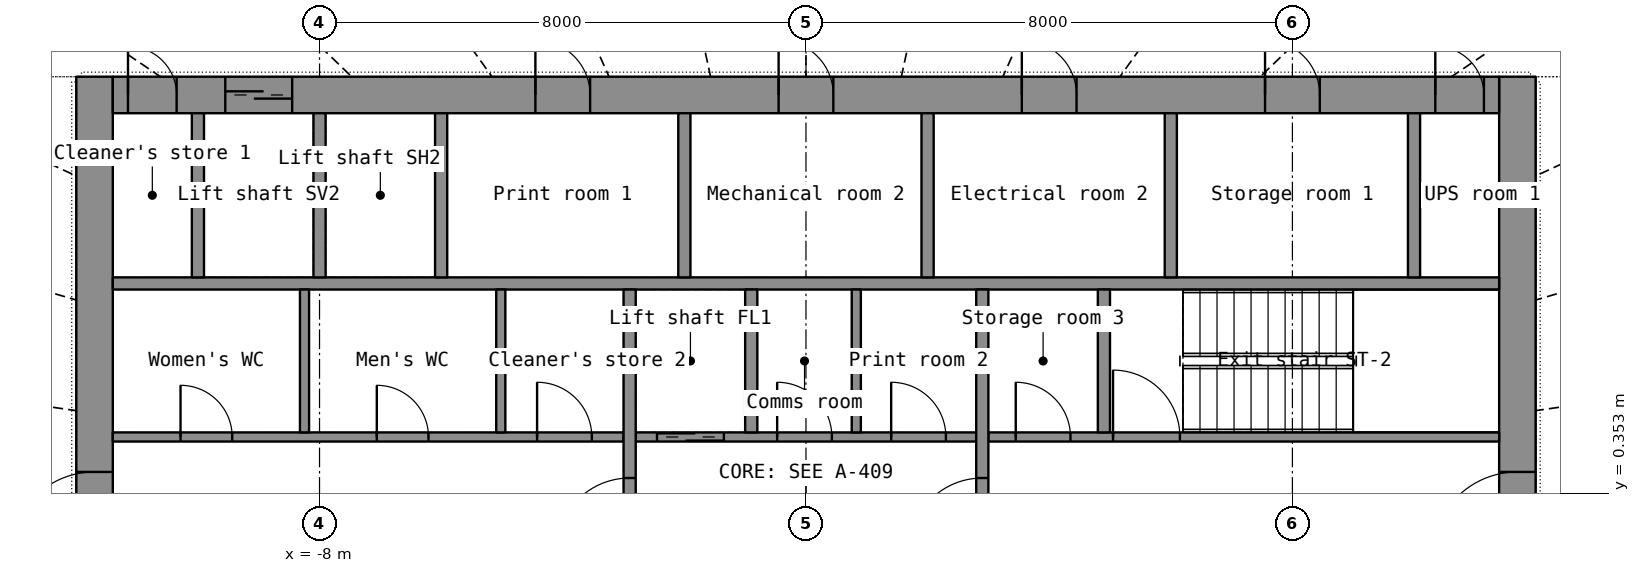
"""IFC4 building model, lengths in metres.
Left out: names, types, materials, properties, quantities, classifications, styles, units other than length and angle.
Written with IfcOpenShell. Run it as: python <this file> out.ifc"""

import sys

from ifc_helpers import new_model, si_unit, direction, frame, frame_2d, origin, place, context, subcontext, project, spatial, rectangle, extrude, element, fill, save


model = new_model("IFC4")
c1 = context("Model", 3, precision=1e-05, world=origin(), true_north=direction((0.0, 1.0)))
c2 = subcontext(c1, "Body", "Model", "MODEL_VIEW")
j1 = project(units=[si_unit("LENGTHUNIT", "METRE"), si_unit("PLANEANGLEUNIT", "RADIAN")], contexts=[c1])
p1 = place(None, origin())
s1 = spatial("IfcSite", under=j1, at=p1, CompositionType="ELEMENT")
p2 = place(p1, origin())
s2 = spatial("IfcBuilding", under=s1, at=p2, CompositionType="ELEMENT")
p3 = place(p2, frame((0.0, 0.0, 48.2)))
s3 = spatial("IfcBuildingStorey", under=s2, at=p3, CompositionType="ELEMENT", Elevation=48.2)
p4 = place(p3, frame((-11.7, -7.2, 0.0), z_axis=(0.0, 0.0, 1.0), x_axis=(0.0, 1.0, 0.0)))
e1 = element("IfcWall", 1, at=p4, inside=s3, PredefinedType="SHEAR", context=c2, shape_type="SweptSolid", body=[
    extrude(rectangle(XDim=14.4, YDim=0.6, at=frame_2d((7.2, 0.0))), origin(), (0.0, 0.0, 1.0), 3.3),
])
p5 = place(p4, frame((6.5, 0.0, 0.0)))
e2 = element("IfcOpeningElement", 2, at=p5, cuts=e1, PredefinedType="OPENING", context=c2, shape_type="SweptSolid", body=[
    extrude(rectangle(XDim=1.4, YDim=2.2, at=frame_2d((0.7, 1.1))), frame((0.0, 0.31, 0.0), z_axis=(0.0, -1.0, 0.0), x_axis=(1.0, 0.0, 0.0)), (0.0, 0.0, 1.0), 0.62),
])
p6 = place(p3, frame((11.7, -7.2, 0.0), z_axis=(0.0, 0.0, 1.0), x_axis=(0.0, 1.0, 0.0)))
e3 = element("IfcWall", 3, at=p6, inside=s3, PredefinedType="SHEAR", context=c2, shape_type="SweptSolid", body=[
    extrude(rectangle(XDim=14.4, YDim=0.6, at=frame_2d((7.2, 0.0))), origin(), (0.0, 0.0, 1.0), 3.3),
])
p7 = place(p6, frame((6.5, 0.0, 0.0)))
e4 = element("IfcOpeningElement", 4, at=p7, cuts=e3, PredefinedType="OPENING", context=c2, shape_type="SweptSolid", body=[
    extrude(rectangle(XDim=1.4, YDim=2.2, at=frame_2d((0.7, 1.1))), frame((0.0, 0.31, 0.0), z_axis=(0.0, -1.0, 0.0), x_axis=(1.0, 0.0, 0.0)), (0.0, 0.0, 1.0), 0.62),
])
p8 = place(p3, frame((-11.4, 6.9, 0.0), z_axis=(0.0, 0.0, 1.0), x_axis=(1.0, 0.0, 0.0)))
e5 = element("IfcWall", 5, at=p8, inside=s3, PredefinedType="SHEAR", context=c2, shape_type="SweptSolid", body=[
    extrude(rectangle(XDim=22.8, YDim=0.6, at=frame_2d((11.4, 0.0))), origin(), (0.0, 0.0, 1.0), 3.3),
])
p9 = place(p8, frame((1.85, 0.0, 0.0)))
e6 = element("IfcOpeningElement", 6, at=p9, cuts=e5, PredefinedType="OPENING", context=c2, shape_type="SweptSolid", body=[
    extrude(rectangle(XDim=1.1, YDim=2.2, at=frame_2d((0.55, 1.1))), frame((0.0, 0.31, 0.0), z_axis=(0.0, -1.0, 0.0), x_axis=(1.0, 0.0, 0.0)), (0.0, 0.0, 1.0), 0.62),
])
p10 = place(p8, frame((6.95, 0.0, 0.0)))
e7 = element("IfcOpeningElement", 7, at=p10, cuts=e5, PredefinedType="OPENING", context=c2, shape_type="SweptSolid", body=[
    extrude(rectangle(XDim=0.9, YDim=2.1, at=frame_2d((0.45, 1.05))), frame((0.0, 0.31, 0.0), z_axis=(0.0, -1.0, 0.0), x_axis=(1.0, 0.0, 0.0)), (0.0, 0.0, 1.0), 0.62),
])
p11 = place(p8, frame((10.95, 0.0, 0.0)))
e8 = element("IfcOpeningElement", 8, at=p11, cuts=e5, PredefinedType="OPENING", context=c2, shape_type="SweptSolid", body=[
    extrude(rectangle(XDim=0.9, YDim=2.1, at=frame_2d((0.45, 1.05))), frame((0.0, 0.31, 0.0), z_axis=(0.0, -1.0, 0.0), x_axis=(1.0, 0.0, 0.0)), (0.0, 0.0, 1.0), 0.62),
])
p12 = place(p8, frame((14.95, 0.0, 0.0)))
e9 = element("IfcOpeningElement", 9, at=p12, cuts=e5, PredefinedType="OPENING", context=c2, shape_type="SweptSolid", body=[
    extrude(rectangle(XDim=0.9, YDim=2.1, at=frame_2d((0.45, 1.05))), frame((0.0, 0.31, 0.0), z_axis=(0.0, -1.0, 0.0), x_axis=(1.0, 0.0, 0.0)), (0.0, 0.0, 1.0), 0.62),
])
p13 = place(p8, frame((18.95, 0.0, 0.0)))
e10 = element("IfcOpeningElement", 10, at=p13, cuts=e5, PredefinedType="OPENING", context=c2, shape_type="SweptSolid", body=[
    extrude(rectangle(XDim=0.9, YDim=2.1, at=frame_2d((0.45, 1.05))), frame((0.0, 0.31, 0.0), z_axis=(0.0, -1.0, 0.0), x_axis=(1.0, 0.0, 0.0)), (0.0, 0.0, 1.0), 0.62),
])
p14 = place(p8, frame((0.25, 0.0, 0.0)))
e11 = element("IfcOpeningElement", 11, at=p14, cuts=e5, PredefinedType="OPENING", context=c2, shape_type="SweptSolid", body=[
    extrude(rectangle(XDim=0.8, YDim=2.05, at=frame_2d((0.4, 1.025))), frame((0.0, 0.31, 0.0), z_axis=(0.0, -1.0, 0.0), x_axis=(1.0, 0.0, 0.0)), (0.0, 0.0, 1.0), 0.62),
])
p15 = place(p8, frame((21.75, 0.0, 0.0)))
e12 = element("IfcOpeningElement", 12, at=p15, cuts=e5, PredefinedType="OPENING", context=c2, shape_type="SweptSolid", body=[
    extrude(rectangle(XDim=0.8, YDim=2.05, at=frame_2d((0.4, 1.025))), frame((0.0, 0.31, 0.0), z_axis=(0.0, -1.0, 0.0), x_axis=(1.0, 0.0, 0.0)), (0.0, 0.0, 1.0), 0.62),
])
p16 = place(p3, frame((-11.4, 3.8, 0.0), z_axis=(0.0, 0.0, 1.0), x_axis=(1.0, 0.0, 0.0)))
e13 = element("IfcWall", 13, at=p16, inside=s3, PredefinedType="SHEAR", context=c2, shape_type="SweptSolid", body=[
    extrude(rectangle(XDim=22.8, YDim=0.2, at=frame_2d((11.4, 0.0))), origin(), (0.0, 0.0, 1.0), 3.3),
])
for number, where, z_axis, x_axis in (
    (14, (-10.0, 3.9, 0.0), (0.0, 0.0, 1.0), (0.0, 1.0, 0.0)),
    (15, (-8.0, 3.9, 0.0), (0.0, 0.0, 1.0), (0.0, 1.0, 0.0)),
    (16, (-6.0, 3.9, 0.0), (0.0, 0.0, 1.0), (0.0, 1.0, 0.0)),
    (17, (10.0, 3.9, 0.0), (0.0, 0.0, 1.0), (0.0, 1.0, 0.0)),
):
    element("IfcWall", number, at=place(p3, frame(where, z_axis=z_axis, x_axis=x_axis)), inside=s3, PredefinedType="SHEAR", context=c2, shape_type="SweptSolid", body=[
        extrude(rectangle(XDim=2.7, YDim=0.2, at=frame_2d((1.35, 0.0))), origin(), (0.0, 0.0, 1.0), 3.3),
    ])
for number, where, z_axis, x_axis in (
    (18, (-2.0, 3.9, 0.0), (0.0, 0.0, 1.0), (0.0, 1.0, 0.0)),
    (19, (2.0, 3.9, 0.0), (0.0, 0.0, 1.0), (0.0, 1.0, 0.0)),
    (20, (6.0, 3.9, 0.0), (0.0, 0.0, 1.0), (0.0, 1.0, 0.0)),
):
    element("IfcWall", number, at=place(p3, frame(where, z_axis=z_axis, x_axis=x_axis)), inside=s3, PredefinedType="PARTITIONING", context=c2, shape_type="SweptSolid", body=[
        extrude(rectangle(XDim=2.7, YDim=0.2, at=frame_2d((1.35, 0.0))), origin(), (0.0, 0.0, 1.0), 3.3),
    ])
p17 = place(p3, frame((-11.4, 1.275, 0.0), z_axis=(0.0, 0.0, 1.0), x_axis=(1.0, 0.0, 0.0)))
e21 = element("IfcWall", 21, at=p17, inside=s3, PredefinedType="PARTITIONING", context=c2, shape_type="SweptSolid", body=[
    extrude(rectangle(XDim=8.4, YDim=0.15, at=frame_2d((4.2, 0.0))), origin(), (0.0, 0.0, 1.0), 3.3),
])
p18 = place(p17, frame((1.114, 0.0, 0.0)))
e22 = element("IfcOpeningElement", 22, at=p18, cuts=e21, PredefinedType="OPENING", context=c2, shape_type="SweptSolid", body=[
    extrude(rectangle(XDim=0.85, YDim=2.1, at=frame_2d((0.425, 1.05))), frame((0.0, 0.085, 0.0), z_axis=(0.0, -1.0, 0.0), x_axis=(1.0, 0.0, 0.0)), (0.0, 0.0, 1.0), 0.17),
])
p19 = place(p17, frame((4.342, 0.0, 0.0)))
e23 = element("IfcOpeningElement", 23, at=p19, cuts=e21, PredefinedType="OPENING", context=c2, shape_type="SweptSolid", body=[
    extrude(rectangle(XDim=0.85, YDim=2.1, at=frame_2d((0.425, 1.05))), frame((0.0, 0.085, 0.0), z_axis=(0.0, -1.0, 0.0), x_axis=(1.0, 0.0, 0.0)), (0.0, 0.0, 1.0), 0.17),
])
p20 = place(p17, frame((6.978, 0.0, 0.0)))
e24 = element("IfcOpeningElement", 24, at=p20, cuts=e21, PredefinedType="OPENING", context=c2, shape_type="SweptSolid", body=[
    extrude(rectangle(XDim=0.9, YDim=2.1, at=frame_2d((0.45, 1.05))), frame((0.0, 0.085, 0.0), z_axis=(0.0, -1.0, 0.0), x_axis=(1.0, 0.0, 0.0)), (0.0, 0.0, 1.0), 0.17),
])
p21 = place(p3, frame((-2.8, 1.275, 0.0), z_axis=(0.0, 0.0, 1.0), x_axis=(1.0, 0.0, 0.0)))
e25 = element("IfcWall", 25, at=p21, inside=s3, PredefinedType="SHEAR", context=c2, shape_type="SweptSolid", body=[
    extrude(rectangle(XDim=5.6, YDim=0.15, at=frame_2d((2.8, 0.0))), origin(), (0.0, 0.0, 1.0), 3.3),
])
p22 = place(p21, frame((0.35, 0.0, 0.0)))
e26 = element("IfcOpeningElement", 26, at=p22, cuts=e25, PredefinedType="OPENING", context=c2, shape_type="SweptSolid", body=[
    extrude(rectangle(XDim=1.1, YDim=2.2, at=frame_2d((0.55, 1.1))), frame((0.0, 0.085, 0.0), z_axis=(0.0, -1.0, 0.0), x_axis=(1.0, 0.0, 0.0)), (0.0, 0.0, 1.0), 0.17),
])
p23 = place(p21, frame((2.326, 0.0, 0.0)))
e27 = element("IfcOpeningElement", 27, at=p23, cuts=e25, PredefinedType="OPENING", context=c2, shape_type="SweptSolid", body=[
    extrude(rectangle(XDim=0.9, YDim=2.1, at=frame_2d((0.45, 1.05))), frame((0.0, 0.085, 0.0), z_axis=(0.0, -1.0, 0.0), x_axis=(1.0, 0.0, 0.0)), (0.0, 0.0, 1.0), 0.17),
])
p24 = place(p21, frame((4.201, 0.0, 0.0)))
e28 = element("IfcOpeningElement", 28, at=p24, cuts=e25, PredefinedType="OPENING", context=c2, shape_type="SweptSolid", body=[
    extrude(rectangle(XDim=0.9, YDim=2.1, at=frame_2d((0.45, 1.05))), frame((0.0, 0.085, 0.0), z_axis=(0.0, -1.0, 0.0), x_axis=(1.0, 0.0, 0.0)), (0.0, 0.0, 1.0), 0.17),
])
p25 = place(p3, frame((3.0, 1.275, 0.0), z_axis=(0.0, 0.0, 1.0), x_axis=(1.0, 0.0, 0.0)))
e29 = element("IfcWall", 29, at=p25, inside=s3, PredefinedType="SHEAR", context=c2, shape_type="SweptSolid", body=[
    extrude(rectangle(XDim=8.4, YDim=0.15, at=frame_2d((4.2, 0.0))), origin(), (0.0, 0.0, 1.0), 3.3),
])
p26 = place(p25, frame((2.05, 0.0, 0.0)))
e30 = element("IfcOpeningElement", 30, at=p26, cuts=e29, PredefinedType="OPENING", context=c2, shape_type="SweptSolid", body=[
    extrude(rectangle(XDim=1.1, YDim=2.15, at=frame_2d((0.55, 1.075))), frame((0.0, 0.085, 0.0), z_axis=(0.0, -1.0, 0.0), x_axis=(1.0, 0.0, 0.0)), (0.0, 0.0, 1.0), 0.17),
])
p27 = place(p25, frame((0.45, 0.0, 0.0)))
e31 = element("IfcOpeningElement", 31, at=p27, cuts=e29, PredefinedType="OPENING", context=c2, shape_type="SweptSolid", body=[
    extrude(rectangle(XDim=0.9, YDim=2.1, at=frame_2d((0.45, 1.05))), frame((0.0, 0.085, 0.0), z_axis=(0.0, -1.0, 0.0), x_axis=(1.0, 0.0, 0.0)), (0.0, 0.0, 1.0), 0.17),
])
p28 = place(p3, frame((-2.9, -3.7, 0.0), z_axis=(0.0, 0.0, 1.0), x_axis=(0.0, 1.0, 0.0)))
e32 = element("IfcWall", 32, at=p28, inside=s3, PredefinedType="SHEAR", context=c2, shape_type="SweptSolid", body=[
    extrude(rectangle(XDim=7.4, YDim=0.2, at=frame_2d((3.7, 0.0))), origin(), (0.0, 0.0, 1.0), 3.3),
])
p29 = place(p28, frame((3.1, 0.0, 0.0)))
e33 = element("IfcOpeningElement", 33, at=p29, cuts=e32, PredefinedType="OPENING", context=c2, shape_type="SweptSolid", body=[
    extrude(rectangle(XDim=1.2, YDim=2.2, at=frame_2d((0.6, 1.1))), frame((0.0, 0.11, 0.0), z_axis=(0.0, -1.0, 0.0), x_axis=(1.0, 0.0, 0.0)), (0.0, 0.0, 1.0), 0.22),
])
p30 = place(p3, frame((2.9, -3.7, 0.0), z_axis=(0.0, 0.0, 1.0), x_axis=(0.0, 1.0, 0.0)))
e34 = element("IfcWall", 34, at=p30, inside=s3, PredefinedType="SHEAR", context=c2, shape_type="SweptSolid", body=[
    extrude(rectangle(XDim=7.4, YDim=0.2, at=frame_2d((3.7, 0.0))), origin(), (0.0, 0.0, 1.0), 3.3),
])
p31 = place(p30, frame((3.1, 0.0, 0.0)))
e35 = element("IfcOpeningElement", 35, at=p31, cuts=e34, PredefinedType="OPENING", context=c2, shape_type="SweptSolid", body=[
    extrude(rectangle(XDim=1.2, YDim=2.2, at=frame_2d((0.6, 1.1))), frame((0.0, 0.11, 0.0), z_axis=(0.0, -1.0, 0.0), x_axis=(1.0, 0.0, 0.0)), (0.0, 0.0, 1.0), 0.22),
])
for number, where, z_axis, x_axis in (
    (36, (-0.9, 1.35, 0.0), (0.0, 0.0, 1.0), (0.0, 1.0, 0.0)),
    (37, (4.9, 1.35, 0.0), (0.0, 0.0, 1.0), (0.0, 1.0, 0.0)),
):
    element("IfcWall", number, at=place(p3, frame(where, z_axis=z_axis, x_axis=x_axis)), inside=s3, PredefinedType="SHEAR", context=c2, shape_type="SweptSolid", body=[
        extrude(rectangle(XDim=2.35, YDim=0.2, at=frame_2d((1.175, 0.0))), origin(), (0.0, 0.0, 1.0), 3.3),
    ])
for number, where, z_axis, x_axis in (
    (38, (-8.247, 1.35, 0.0), (0.0, 0.0, 1.0), (0.0, 1.0, 0.0)),
    (39, (-5.019, 1.35, 0.0), (0.0, 0.0, 1.0), (0.0, 1.0, 0.0)),
    (40, (0.827, 1.35, 0.0), (0.0, 0.0, 1.0), (0.0, 1.0, 0.0)),
):
    element("IfcWall", number, at=place(p3, frame(where, z_axis=z_axis, x_axis=x_axis)), inside=s3, PredefinedType="PARTITIONING", context=c2, shape_type="SweptSolid", body=[
        extrude(rectangle(XDim=2.35, YDim=0.15, at=frame_2d((1.175, 0.0))), origin(), (0.0, 0.0, 1.0), 3.3),
    ])
p32 = place(p9, origin())
e41 = element("IfcDoor", 41, at=p32, inside=s3, OperationType="DOUBLE_DOOR_SLIDING", PredefinedType="DOOR", context=c2, shape_type="SweptSolid", body=[
    extrude(rectangle(XDim=1.1, YDim=2.2, at=frame_2d((0.55, 1.1))), frame((0.0, 0.025, 0.0), z_axis=(0.0, -1.0, 0.0), x_axis=(1.0, 0.0, 0.0)), (0.0, 0.0, 1.0), 0.05),
])
fill(e6, e41)
p33 = place(p10, origin())
e42 = element("IfcDoor", 42, at=p33, inside=s3, OperationType="SINGLE_SWING_LEFT", PredefinedType="DOOR", context=c2, shape_type="SweptSolid", body=[
    extrude(rectangle(XDim=0.9, YDim=2.1, at=frame_2d((0.45, 1.05))), frame((0.0, 0.025, 0.0), z_axis=(0.0, -1.0, 0.0), x_axis=(1.0, 0.0, 0.0)), (0.0, 0.0, 1.0), 0.05),
])
fill(e7, e42)
p34 = place(p11, origin())
e43 = element("IfcDoor", 43, at=p34, inside=s3, OperationType="SINGLE_SWING_LEFT", PredefinedType="DOOR", context=c2, shape_type="SweptSolid", body=[
    extrude(rectangle(XDim=0.9, YDim=2.1, at=frame_2d((0.45, 1.05))), frame((0.0, 0.025, 0.0), z_axis=(0.0, -1.0, 0.0), x_axis=(1.0, 0.0, 0.0)), (0.0, 0.0, 1.0), 0.05),
])
fill(e8, e43)
p35 = place(p12, origin())
e44 = element("IfcDoor", 44, at=p35, inside=s3, OperationType="SINGLE_SWING_LEFT", PredefinedType="DOOR", context=c2, shape_type="SweptSolid", body=[
    extrude(rectangle(XDim=0.9, YDim=2.1, at=frame_2d((0.45, 1.05))), frame((0.0, 0.025, 0.0), z_axis=(0.0, -1.0, 0.0), x_axis=(1.0, 0.0, 0.0)), (0.0, 0.0, 1.0), 0.05),
])
fill(e9, e44)
p36 = place(p13, origin())
e45 = element("IfcDoor", 45, at=p36, inside=s3, OperationType="SINGLE_SWING_LEFT", PredefinedType="DOOR", context=c2, shape_type="SweptSolid", body=[
    extrude(rectangle(XDim=0.9, YDim=2.1, at=frame_2d((0.45, 1.05))), frame((0.0, 0.025, 0.0), z_axis=(0.0, -1.0, 0.0), x_axis=(1.0, 0.0, 0.0)), (0.0, 0.0, 1.0), 0.05),
])
fill(e10, e45)
p37 = place(p14, origin())
e46 = element("IfcDoor", 46, at=p37, inside=s3, OperationType="SINGLE_SWING_LEFT", PredefinedType="DOOR", context=c2, shape_type="SweptSolid", body=[
    extrude(rectangle(XDim=0.8, YDim=2.05, at=frame_2d((0.4, 1.025))), frame((0.0, 0.025, 0.0), z_axis=(0.0, -1.0, 0.0), x_axis=(1.0, 0.0, 0.0)), (0.0, 0.0, 1.0), 0.05),
])
fill(e11, e46)
p38 = place(p15, origin())
e47 = element("IfcDoor", 47, at=p38, inside=s3, OperationType="SINGLE_SWING_LEFT", PredefinedType="DOOR", context=c2, shape_type="SweptSolid", body=[
    extrude(rectangle(XDim=0.8, YDim=2.05, at=frame_2d((0.4, 1.025))), frame((0.0, 0.025, 0.0), z_axis=(0.0, -1.0, 0.0), x_axis=(1.0, 0.0, 0.0)), (0.0, 0.0, 1.0), 0.05),
])
fill(e12, e47)
p39 = place(p5, origin())
e48 = element("IfcDoor", 48, at=p39, inside=s3, OperationType="DOUBLE_DOOR_SINGLE_SWING", PredefinedType="DOOR", context=c2, shape_type="SweptSolid", body=[
    extrude(rectangle(XDim=1.4, YDim=2.2, at=frame_2d((0.7, 1.1))), frame((0.0, 0.025, 0.0), z_axis=(0.0, -1.0, 0.0), x_axis=(1.0, 0.0, 0.0)), (0.0, 0.0, 1.0), 0.05),
])
fill(e2, e48)
p40 = place(p7, origin())
e49 = element("IfcDoor", 49, at=p40, inside=s3, OperationType="DOUBLE_DOOR_SINGLE_SWING", PredefinedType="DOOR", context=c2, shape_type="SweptSolid", body=[
    extrude(rectangle(XDim=1.4, YDim=2.2, at=frame_2d((0.7, 1.1))), frame((0.0, 0.025, 0.0), z_axis=(0.0, -1.0, 0.0), x_axis=(1.0, 0.0, 0.0)), (0.0, 0.0, 1.0), 0.05),
])
fill(e4, e49)
p41 = place(p29, origin())
e50 = element("IfcDoor", 50, at=p41, inside=s3, OperationType="SINGLE_SWING_LEFT", PredefinedType="DOOR", context=c2, shape_type="SweptSolid", body=[
    extrude(rectangle(XDim=1.2, YDim=2.2, at=frame_2d((0.6, 1.1))), frame((0.0, 0.025, 0.0), z_axis=(0.0, -1.0, 0.0), x_axis=(1.0, 0.0, 0.0)), (0.0, 0.0, 1.0), 0.05),
])
fill(e33, e50)
p42 = place(p31, origin())
e51 = element("IfcDoor", 51, at=p42, inside=s3, OperationType="SINGLE_SWING_LEFT", PredefinedType="DOOR", context=c2, shape_type="SweptSolid", body=[
    extrude(rectangle(XDim=1.2, YDim=2.2, at=frame_2d((0.6, 1.1))), frame((0.0, 0.025, 0.0), z_axis=(0.0, -1.0, 0.0), x_axis=(1.0, 0.0, 0.0)), (0.0, 0.0, 1.0), 0.05),
])
fill(e35, e51)
p43 = place(p22, origin())
e52 = element("IfcDoor", 52, at=p43, inside=s3, OperationType="DOUBLE_DOOR_SLIDING", PredefinedType="DOOR", context=c2, shape_type="SweptSolid", body=[
    extrude(rectangle(XDim=1.1, YDim=2.2, at=frame_2d((0.55, 1.1))), frame((0.0, 0.025, 0.0), z_axis=(0.0, -1.0, 0.0), x_axis=(1.0, 0.0, 0.0)), (0.0, 0.0, 1.0), 0.05),
])
fill(e26, e52)
p44 = place(p26, origin())
e53 = element("IfcDoor", 53, at=p44, inside=s3, OperationType="SINGLE_SWING_LEFT", PredefinedType="DOOR", context=c2, shape_type="SweptSolid", body=[
    extrude(rectangle(XDim=1.1, YDim=2.15, at=frame_2d((0.55, 1.075))), frame((0.0, 0.025, 0.0), z_axis=(0.0, -1.0, 0.0), x_axis=(1.0, 0.0, 0.0)), (0.0, 0.0, 1.0), 0.05),
])
fill(e30, e53)
p45 = place(p18, origin())
e54 = element("IfcDoor", 54, at=p45, inside=s3, OperationType="SINGLE_SWING_LEFT", PredefinedType="DOOR", context=c2, shape_type="SweptSolid", body=[
    extrude(rectangle(XDim=0.85, YDim=2.1, at=frame_2d((0.425, 1.05))), frame((0.0, 0.025, 0.0), z_axis=(0.0, -1.0, 0.0), x_axis=(1.0, 0.0, 0.0)), (0.0, 0.0, 1.0), 0.05),
])
fill(e22, e54)
p46 = place(p19, origin())
e55 = element("IfcDoor", 55, at=p46, inside=s3, OperationType="SINGLE_SWING_LEFT", PredefinedType="DOOR", context=c2, shape_type="SweptSolid", body=[
    extrude(rectangle(XDim=0.85, YDim=2.1, at=frame_2d((0.425, 1.05))), frame((0.0, 0.025, 0.0), z_axis=(0.0, -1.0, 0.0), x_axis=(1.0, 0.0, 0.0)), (0.0, 0.0, 1.0), 0.05),
])
fill(e23, e55)
p47 = place(p20, origin())
e56 = element("IfcDoor", 56, at=p47, inside=s3, OperationType="SINGLE_SWING_LEFT", PredefinedType="DOOR", context=c2, shape_type="SweptSolid", body=[
    extrude(rectangle(XDim=0.9, YDim=2.1, at=frame_2d((0.45, 1.05))), frame((0.0, 0.025, 0.0), z_axis=(0.0, -1.0, 0.0), x_axis=(1.0, 0.0, 0.0)), (0.0, 0.0, 1.0), 0.05),
])
fill(e24, e56)
p48 = place(p23, origin())
e57 = element("IfcDoor", 57, at=p48, inside=s3, OperationType="SINGLE_SWING_LEFT", PredefinedType="DOOR", context=c2, shape_type="SweptSolid", body=[
    extrude(rectangle(XDim=0.9, YDim=2.1, at=frame_2d((0.45, 1.05))), frame((0.0, 0.025, 0.0), z_axis=(0.0, -1.0, 0.0), x_axis=(1.0, 0.0, 0.0)), (0.0, 0.0, 1.0), 0.05),
])
fill(e27, e57)
p49 = place(p24, origin())
e58 = element("IfcDoor", 58, at=p49, inside=s3, OperationType="SINGLE_SWING_LEFT", PredefinedType="DOOR", context=c2, shape_type="SweptSolid", body=[
    extrude(rectangle(XDim=0.9, YDim=2.1, at=frame_2d((0.45, 1.05))), frame((0.0, 0.025, 0.0), z_axis=(0.0, -1.0, 0.0), x_axis=(1.0, 0.0, 0.0)), (0.0, 0.0, 1.0), 0.05),
])
fill(e28, e58)
p50 = place(p27, origin())
e59 = element("IfcDoor", 59, at=p50, inside=s3, OperationType="SINGLE_SWING_LEFT", PredefinedType="DOOR", context=c2, shape_type="SweptSolid", body=[
    extrude(rectangle(XDim=0.9, YDim=2.1, at=frame_2d((0.45, 1.05))), frame((0.0, 0.025, 0.0), z_axis=(0.0, -1.0, 0.0), x_axis=(1.0, 0.0, 0.0)), (0.0, 0.0, 1.0), 0.05),
])
fill(e31, e59)
save(model, sys.argv[1])
